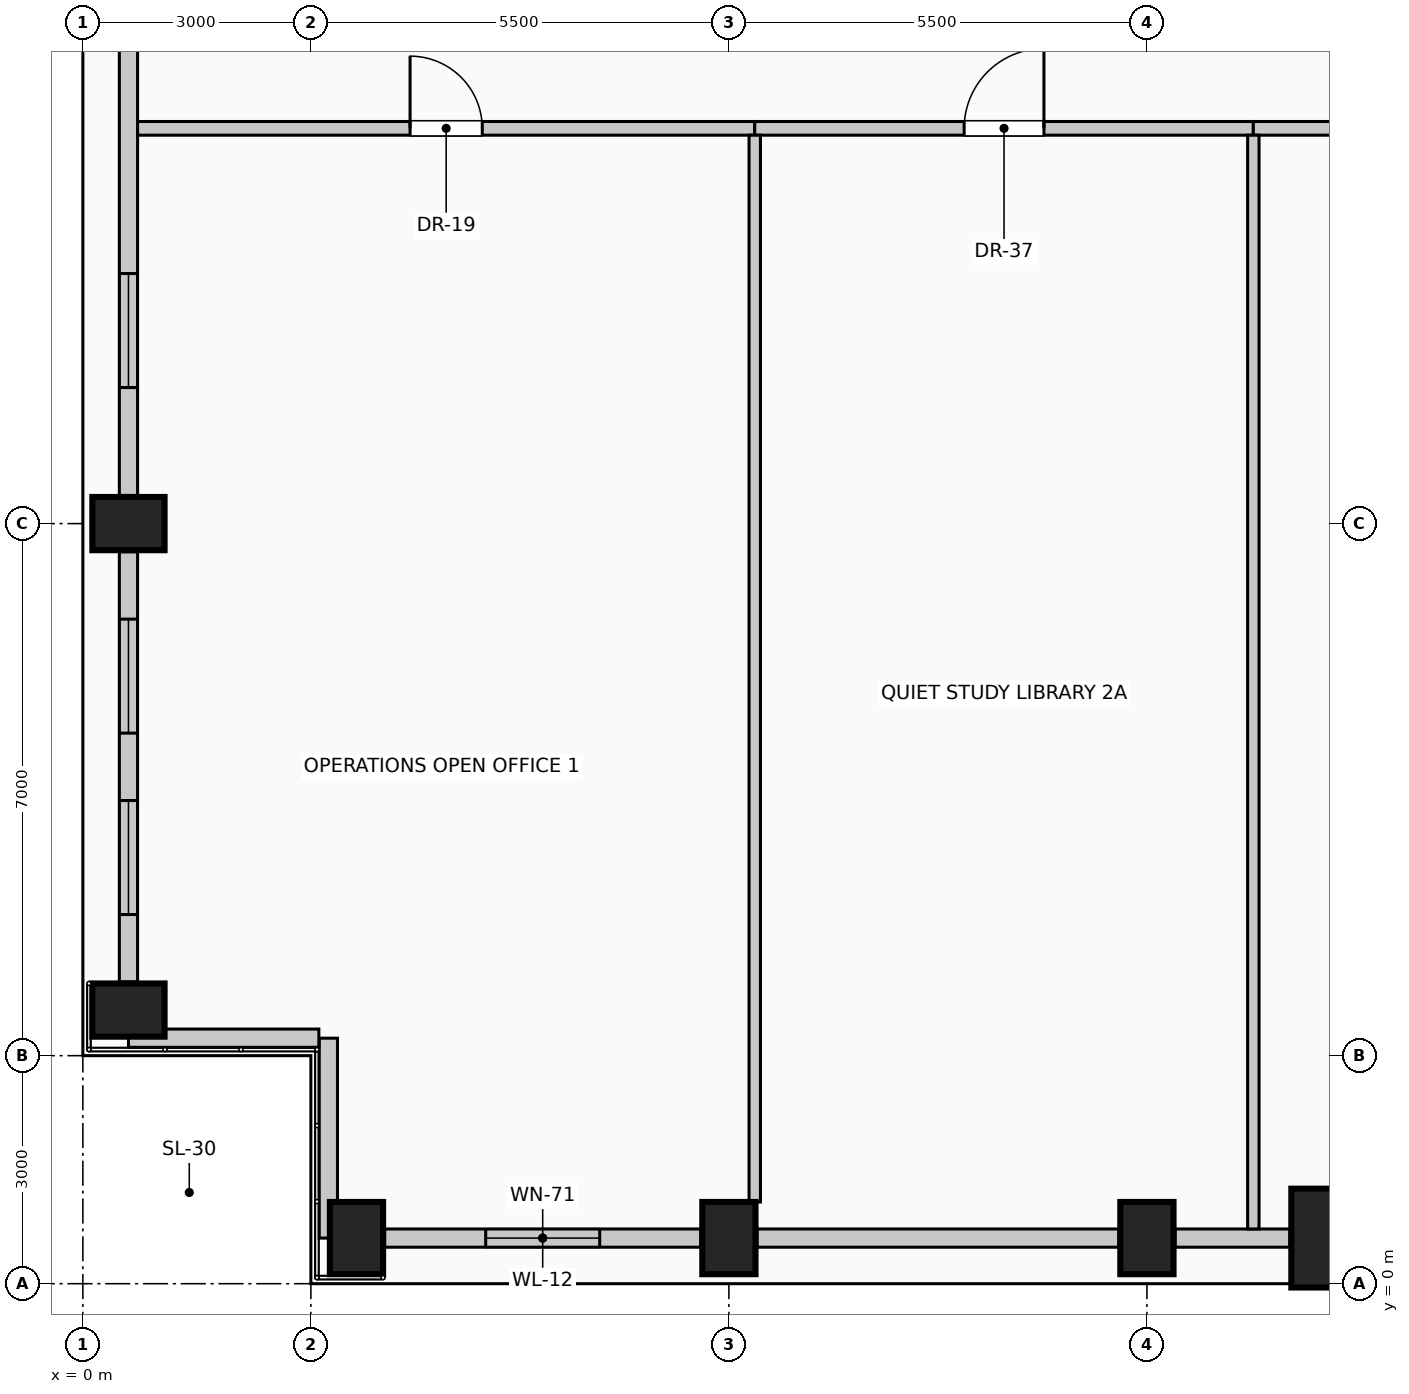
"""IFC4 building model, lengths in metres.
Left out: names, types, materials, properties, quantities, classifications, styles, units other than length and angle.
Written with IfcOpenShell. Run it as: python <this file> out.ifc"""

import sys

from ifc_helpers import new_model, si_unit, direction, frame, frame_2d, origin, origin_2d, place, context, subcontext, project, spatial, rectangle, extrude, element, fill, save


model = new_model("IFC4")
c1 = context("Model", 3, precision=1e-05, world=origin(), true_north=direction((0.0, 1.0)))
c2 = subcontext(c1, "Body", "Model", "MODEL_VIEW")
j1 = project(units=[si_unit("LENGTHUNIT", "METRE"), si_unit("PLANEANGLEUNIT", "RADIAN")], contexts=[c1])
p1 = place(None, origin())
s1 = spatial("IfcSite", under=j1, at=p1, CompositionType="ELEMENT")
p2 = place(p1, origin())
s2 = spatial("IfcBuilding", under=s1, at=p2, CompositionType="ELEMENT")
p3 = place(p2, frame((0.0, 0.0, 285.0)))
s3 = spatial("IfcBuildingStorey", under=s2, at=p3, CompositionType="ELEMENT", Elevation=285.0)
for number, where, z_axis, x_axis in (
    (1, (3.6, 0.6, 0.0), (0.0, 0.0, 1.0), (1.0, 0.0, 0.0)),
    (2, (8.5, 0.6, 0.0), (0.0, 0.0, 1.0), (1.0, 0.0, 0.0)),
    (3, (14.0, 0.6, 0.0), (0.0, 0.0, 1.0), (1.0, 0.0, 0.0)),
):
    element("IfcColumn", number, at=place(p3, frame(where, z_axis=z_axis, x_axis=x_axis)), inside=s3, PredefinedType="COLUMN", context=c2, shape_type="SweptSolid", body=[
        extrude(rectangle(XDim=0.7, YDim=0.95, at=origin_2d()), origin(), (0.0, 0.0, 1.0), 4.0),
    ])
p4 = place(p3, frame((16.4, 0.6, 0.0), z_axis=(0.0, 0.0, 1.0), x_axis=(1.0, 0.0, 0.0)))
e4 = element("IfcColumn", 4, at=p4, inside=s3, PredefinedType="COLUMN", context=c2, shape_type="SweptSolid", body=[
    extrude(rectangle(XDim=1.0, YDim=1.3, at=origin_2d()), origin(), (0.0, 0.0, 1.0), 4.0),
])
for number, where, z_axis, x_axis in (
    (5, (0.6, 3.6, 0.0), (0.0, 0.0, 1.0), (0.0, 1.0, 0.0)),
    (6, (0.6, 10.0, 0.0), (0.0, 0.0, 1.0), (0.0, 1.0, 0.0)),
):
    element("IfcColumn", number, at=place(p3, frame(where, z_axis=z_axis, x_axis=x_axis)), inside=s3, PredefinedType="COLUMN", context=c2, shape_type="SweptSolid", body=[
        extrude(rectangle(XDim=0.7, YDim=0.95, at=origin_2d()), origin(), (0.0, 0.0, 1.0), 4.0),
    ])
p5 = place(p3, frame((8.13, 0.6, 0.0), z_axis=(0.0, 0.0, 1.0), x_axis=(-1.0, 0.0, 0.0)))
e7 = element("IfcWall", 7, at=p5, inside=s3, PredefinedType="SOLIDWALL", context=c2, shape_type="SweptSolid", body=[
    extrude(rectangle(XDim=4.16, YDim=0.24, at=frame_2d((2.08, 0.0))), origin(), (0.0, 0.0, 1.0), 3.025),
])
p6 = place(p5, frame((1.33, 0.0, 0.42)))
e8 = element("IfcOpeningElement", 8, at=p6, cuts=e7, PredefinedType="OPENING", context=c2, shape_type="SweptSolid", body=[
    extrude(rectangle(XDim=1.5, YDim=2.2, at=frame_2d((0.75, 1.1))), frame((0.0, 0.13, 0.0), z_axis=(0.0, -1.0, 0.0), x_axis=(1.0, 0.0, 0.0)), (0.0, 0.0, 1.0), 0.26),
])
p7 = place(p3, frame((13.63, 0.6, 0.0), z_axis=(0.0, 0.0, 1.0), x_axis=(-1.0, 0.0, 0.0)))
e9 = element("IfcWall", 9, at=p7, inside=s3, PredefinedType="SOLIDWALL", context=c2, shape_type="SweptSolid", body=[
    extrude(rectangle(XDim=4.76, YDim=0.24, at=frame_2d((2.38, 0.0))), origin(), (0.0, 0.0, 1.0), 3.025),
])
p8 = place(p3, frame((15.88, 0.6, 0.0), z_axis=(0.0, 0.0, 1.0), x_axis=(-1.0, 0.0, 0.0)))
e10 = element("IfcWall", 10, at=p8, inside=s3, PredefinedType="SOLIDWALL", context=c2, shape_type="SweptSolid", body=[
    extrude(rectangle(XDim=1.51, YDim=0.24, at=frame_2d((0.755, 0.0))), origin(), (0.0, 0.0, 1.0), 3.025),
])
p9 = place(p3, frame((0.6, 3.97, 0.0), z_axis=(0.0, 0.0, 1.0), x_axis=(0.0, 1.0, 0.0)))
e11 = element("IfcWall", 11, at=p9, inside=s3, PredefinedType="SOLIDWALL", context=c2, shape_type="SweptSolid", body=[
    extrude(rectangle(XDim=5.66, YDim=0.24, at=frame_2d((2.83, 0.0))), origin(), (0.0, 0.0, 1.0), 3.025),
])
p10 = place(p9, frame((0.887, 0.0, 0.42)))
e12 = element("IfcOpeningElement", 12, at=p10, cuts=e11, PredefinedType="OPENING", context=c2, shape_type="SweptSolid", body=[
    extrude(rectangle(XDim=1.5, YDim=2.2, at=frame_2d((0.75, 1.1))), frame((0.0, 0.13, 0.0), z_axis=(0.0, -1.0, 0.0), x_axis=(1.0, 0.0, 0.0)), (0.0, 0.0, 1.0), 0.26),
])
p11 = place(p9, frame((3.273, 0.0, 0.42)))
e13 = element("IfcOpeningElement", 13, at=p11, cuts=e11, PredefinedType="OPENING", context=c2, shape_type="SweptSolid", body=[
    extrude(rectangle(XDim=1.5, YDim=2.2, at=frame_2d((0.75, 1.1))), frame((0.0, 0.13, 0.0), z_axis=(0.0, -1.0, 0.0), x_axis=(1.0, 0.0, 0.0)), (0.0, 0.0, 1.0), 0.26),
])
p12 = place(p3, frame((0.6, 10.37, 0.0), z_axis=(0.0, 0.0, 1.0), x_axis=(0.0, 1.0, 0.0)))
e14 = element("IfcWall", 14, at=p12, inside=s3, PredefinedType="SOLIDWALL", context=c2, shape_type="SweptSolid", body=[
    extrude(rectangle(XDim=7.26, YDim=0.24, at=frame_2d((3.63, 0.0))), origin(), (0.0, 0.0, 1.0), 3.025),
])
p13 = place(p12, frame((1.42, 0.0, 0.42)))
e15 = element("IfcOpeningElement", 15, at=p13, cuts=e14, PredefinedType="OPENING", context=c2, shape_type="SweptSolid", body=[
    extrude(rectangle(XDim=1.5, YDim=2.2, at=frame_2d((0.75, 1.1))), frame((0.0, 0.13, 0.0), z_axis=(0.0, -1.0, 0.0), x_axis=(1.0, 0.0, 0.0)), (0.0, 0.0, 1.0), 0.26),
])
p14 = place(p3, frame((3.23, 0.6, 0.0), z_axis=(0.0, 0.0, 1.0), x_axis=(0.0, 1.0, 0.0)))
e16 = element("IfcWall", 16, at=p14, inside=s3, PredefinedType="SOLIDWALL", context=c2, shape_type="SweptSolid", body=[
    extrude(rectangle(XDim=2.63, YDim=0.24, at=frame_2d((1.315, 0.0))), origin(), (0.0, 0.0, 1.0), 3.775),
])
p15 = place(p3, frame((3.105, 3.23, 0.0), z_axis=(0.0, 0.0, 1.0), x_axis=(-1.0, 0.0, 0.0)))
e17 = element("IfcWall", 17, at=p15, inside=s3, PredefinedType="SOLIDWALL", context=c2, shape_type="SweptSolid", body=[
    extrude(rectangle(XDim=2.505, YDim=0.24, at=frame_2d((1.252, 0.0))), origin(), (0.0, 0.0, 1.0), 3.775),
])
p16 = place(p3, frame((0.72, 15.2, 0.0), z_axis=(0.0, 0.0, 1.0), x_axis=(1.0, 0.0, 0.0)))
e18 = element("IfcWall", 18, at=p16, inside=s3, PredefinedType="PARTITIONING", context=c2, shape_type="SweptSolid", body=[
    extrude(rectangle(XDim=8.12, YDim=0.18, at=frame_2d((4.06, 0.0))), origin(), (0.0, 0.0, 1.0), 3.775),
])
p17 = place(p16, frame((3.585, 0.0, 0.0)))
e19 = element("IfcOpeningElement", 19, at=p17, cuts=e18, PredefinedType="OPENING", context=c2, shape_type="SweptSolid", body=[
    extrude(rectangle(XDim=0.95, YDim=2.15, at=frame_2d((0.475, 1.075))), frame((0.0, 0.1, 0.0), z_axis=(0.0, -1.0, 0.0), x_axis=(1.0, 0.0, 0.0)), (0.0, 0.0, 1.0), 0.2),
])
p18 = place(p3, frame((8.84, 15.2, 0.0), z_axis=(0.0, 0.0, 1.0), x_axis=(1.0, 0.0, 0.0)))
e20 = element("IfcWall", 20, at=p18, inside=s3, PredefinedType="PARTITIONING", context=c2, shape_type="SweptSolid", body=[
    extrude(rectangle(XDim=6.56, YDim=0.18, at=frame_2d((3.28, 0.0))), origin(), (0.0, 0.0, 1.0), 3.775),
])
p19 = place(p18, frame((2.755, 0.0, 0.0)))
e21 = element("IfcOpeningElement", 21, at=p19, cuts=e20, PredefinedType="OPENING", context=c2, shape_type="SweptSolid", body=[
    extrude(rectangle(XDim=1.05, YDim=2.15, at=frame_2d((0.525, 1.075))), frame((0.0, 0.1, 0.0), z_axis=(0.0, -1.0, 0.0), x_axis=(1.0, 0.0, 0.0)), (0.0, 0.0, 1.0), 0.2),
])
p20 = place(p3, frame((15.4, 15.2, 0.0), z_axis=(0.0, 0.0, 1.0), x_axis=(1.0, 0.0, 0.0)))
e22 = element("IfcWall", 22, at=p20, inside=s3, PredefinedType="PARTITIONING", context=c2, shape_type="SweptSolid", body=[
    extrude(rectangle(XDim=7.7, YDim=0.18, at=frame_2d((3.85, 0.0))), origin(), (0.0, 0.0, 1.0), 3.775),
])
p21 = place(p20, frame((3.375, 0.0, 0.0)))
e23 = element("IfcOpeningElement", 23, at=p21, cuts=e22, PredefinedType="OPENING", context=c2, shape_type="SweptSolid", body=[
    extrude(rectangle(XDim=0.95, YDim=2.15, at=frame_2d((0.475, 1.075))), frame((0.0, 0.1, 0.0), z_axis=(0.0, -1.0, 0.0), x_axis=(1.0, 0.0, 0.0)), (0.0, 0.0, 1.0), 0.2),
])
p22 = place(p3, frame((8.84, 1.075, 0.0), z_axis=(0.0, 0.0, 1.0), x_axis=(0.0, 1.0, 0.0)))
e24 = element("IfcWall", 24, at=p22, inside=s3, PredefinedType="PARTITIONING", context=c2, shape_type="SweptSolid", body=[
    extrude(rectangle(XDim=14.035, YDim=0.15, at=frame_2d((7.018, 0.0))), origin(), (0.0, 0.0, 1.0), 3.775),
])
p23 = place(p3, frame((15.4, 0.72, 0.0), z_axis=(0.0, 0.0, 1.0), x_axis=(0.0, 1.0, 0.0)))
e25 = element("IfcWall", 25, at=p23, inside=s3, PredefinedType="PARTITIONING", context=c2, shape_type="SweptSolid", body=[
    extrude(rectangle(XDim=14.39, YDim=0.15, at=frame_2d((7.195, 0.0))), origin(), (0.0, 0.0, 1.0), 3.775),
])
p24 = place(p6, origin())
e26 = element("IfcWindow", 26, at=p24, inside=s3, PartitioningType="SINGLE_PANEL", PredefinedType="WINDOW", context=c2, shape_type="SweptSolid", body=[
    extrude(rectangle(XDim=1.5, YDim=2.2, at=frame_2d((0.75, 1.1))), frame((0.0, 0.03, 0.0), z_axis=(0.0, -1.0, 0.0), x_axis=(1.0, 0.0, 0.0)), (0.0, 0.0, 1.0), 0.06),
])
fill(e8, e26)
p25 = place(p10, origin())
e27 = element("IfcWindow", 27, at=p25, inside=s3, PartitioningType="SINGLE_PANEL", PredefinedType="WINDOW", context=c2, shape_type="SweptSolid", body=[
    extrude(rectangle(XDim=1.5, YDim=2.2, at=frame_2d((0.75, 1.1))), frame((0.0, 0.03, 0.0), z_axis=(0.0, -1.0, 0.0), x_axis=(1.0, 0.0, 0.0)), (0.0, 0.0, 1.0), 0.06),
])
fill(e12, e27)
p26 = place(p11, origin())
e28 = element("IfcWindow", 28, at=p26, inside=s3, PartitioningType="SINGLE_PANEL", PredefinedType="WINDOW", context=c2, shape_type="SweptSolid", body=[
    extrude(rectangle(XDim=1.5, YDim=2.2, at=frame_2d((0.75, 1.1))), frame((0.0, 0.03, 0.0), z_axis=(0.0, -1.0, 0.0), x_axis=(1.0, 0.0, 0.0)), (0.0, 0.0, 1.0), 0.06),
])
fill(e13, e28)
p27 = place(p13, origin())
e29 = element("IfcWindow", 29, at=p27, inside=s3, PartitioningType="SINGLE_PANEL", PredefinedType="WINDOW", context=c2, shape_type="SweptSolid", body=[
    extrude(rectangle(XDim=1.5, YDim=2.2, at=frame_2d((0.75, 1.1))), frame((0.0, 0.03, 0.0), z_axis=(0.0, -1.0, 0.0), x_axis=(1.0, 0.0, 0.0)), (0.0, 0.0, 1.0), 0.06),
])
fill(e15, e29)
p28 = place(p17, origin())
e30 = element("IfcDoor", 30, at=p28, inside=s3, OperationType="SINGLE_SWING_LEFT", PredefinedType="DOOR", context=c2, shape_type="SweptSolid", body=[
    extrude(rectangle(XDim=0.95, YDim=2.15, at=frame_2d((0.475, 1.075))), frame((0.0, 0.025, 0.0), z_axis=(0.0, -1.0, 0.0), x_axis=(1.0, 0.0, 0.0)), (0.0, 0.0, 1.0), 0.05),
])
fill(e19, e30)
p29 = place(p19, origin())
e31 = element("IfcDoor", 31, at=p29, inside=s3, OperationType="SINGLE_SWING_RIGHT", PredefinedType="DOOR", context=c2, shape_type="SweptSolid", body=[
    extrude(rectangle(XDim=1.05, YDim=2.15, at=frame_2d((0.525, 1.075))), frame((0.0, 0.025, 0.0), z_axis=(0.0, -1.0, 0.0), x_axis=(1.0, 0.0, 0.0)), (0.0, 0.0, 1.0), 0.05),
])
fill(e21, e31)
save(model, sys.argv[1])
